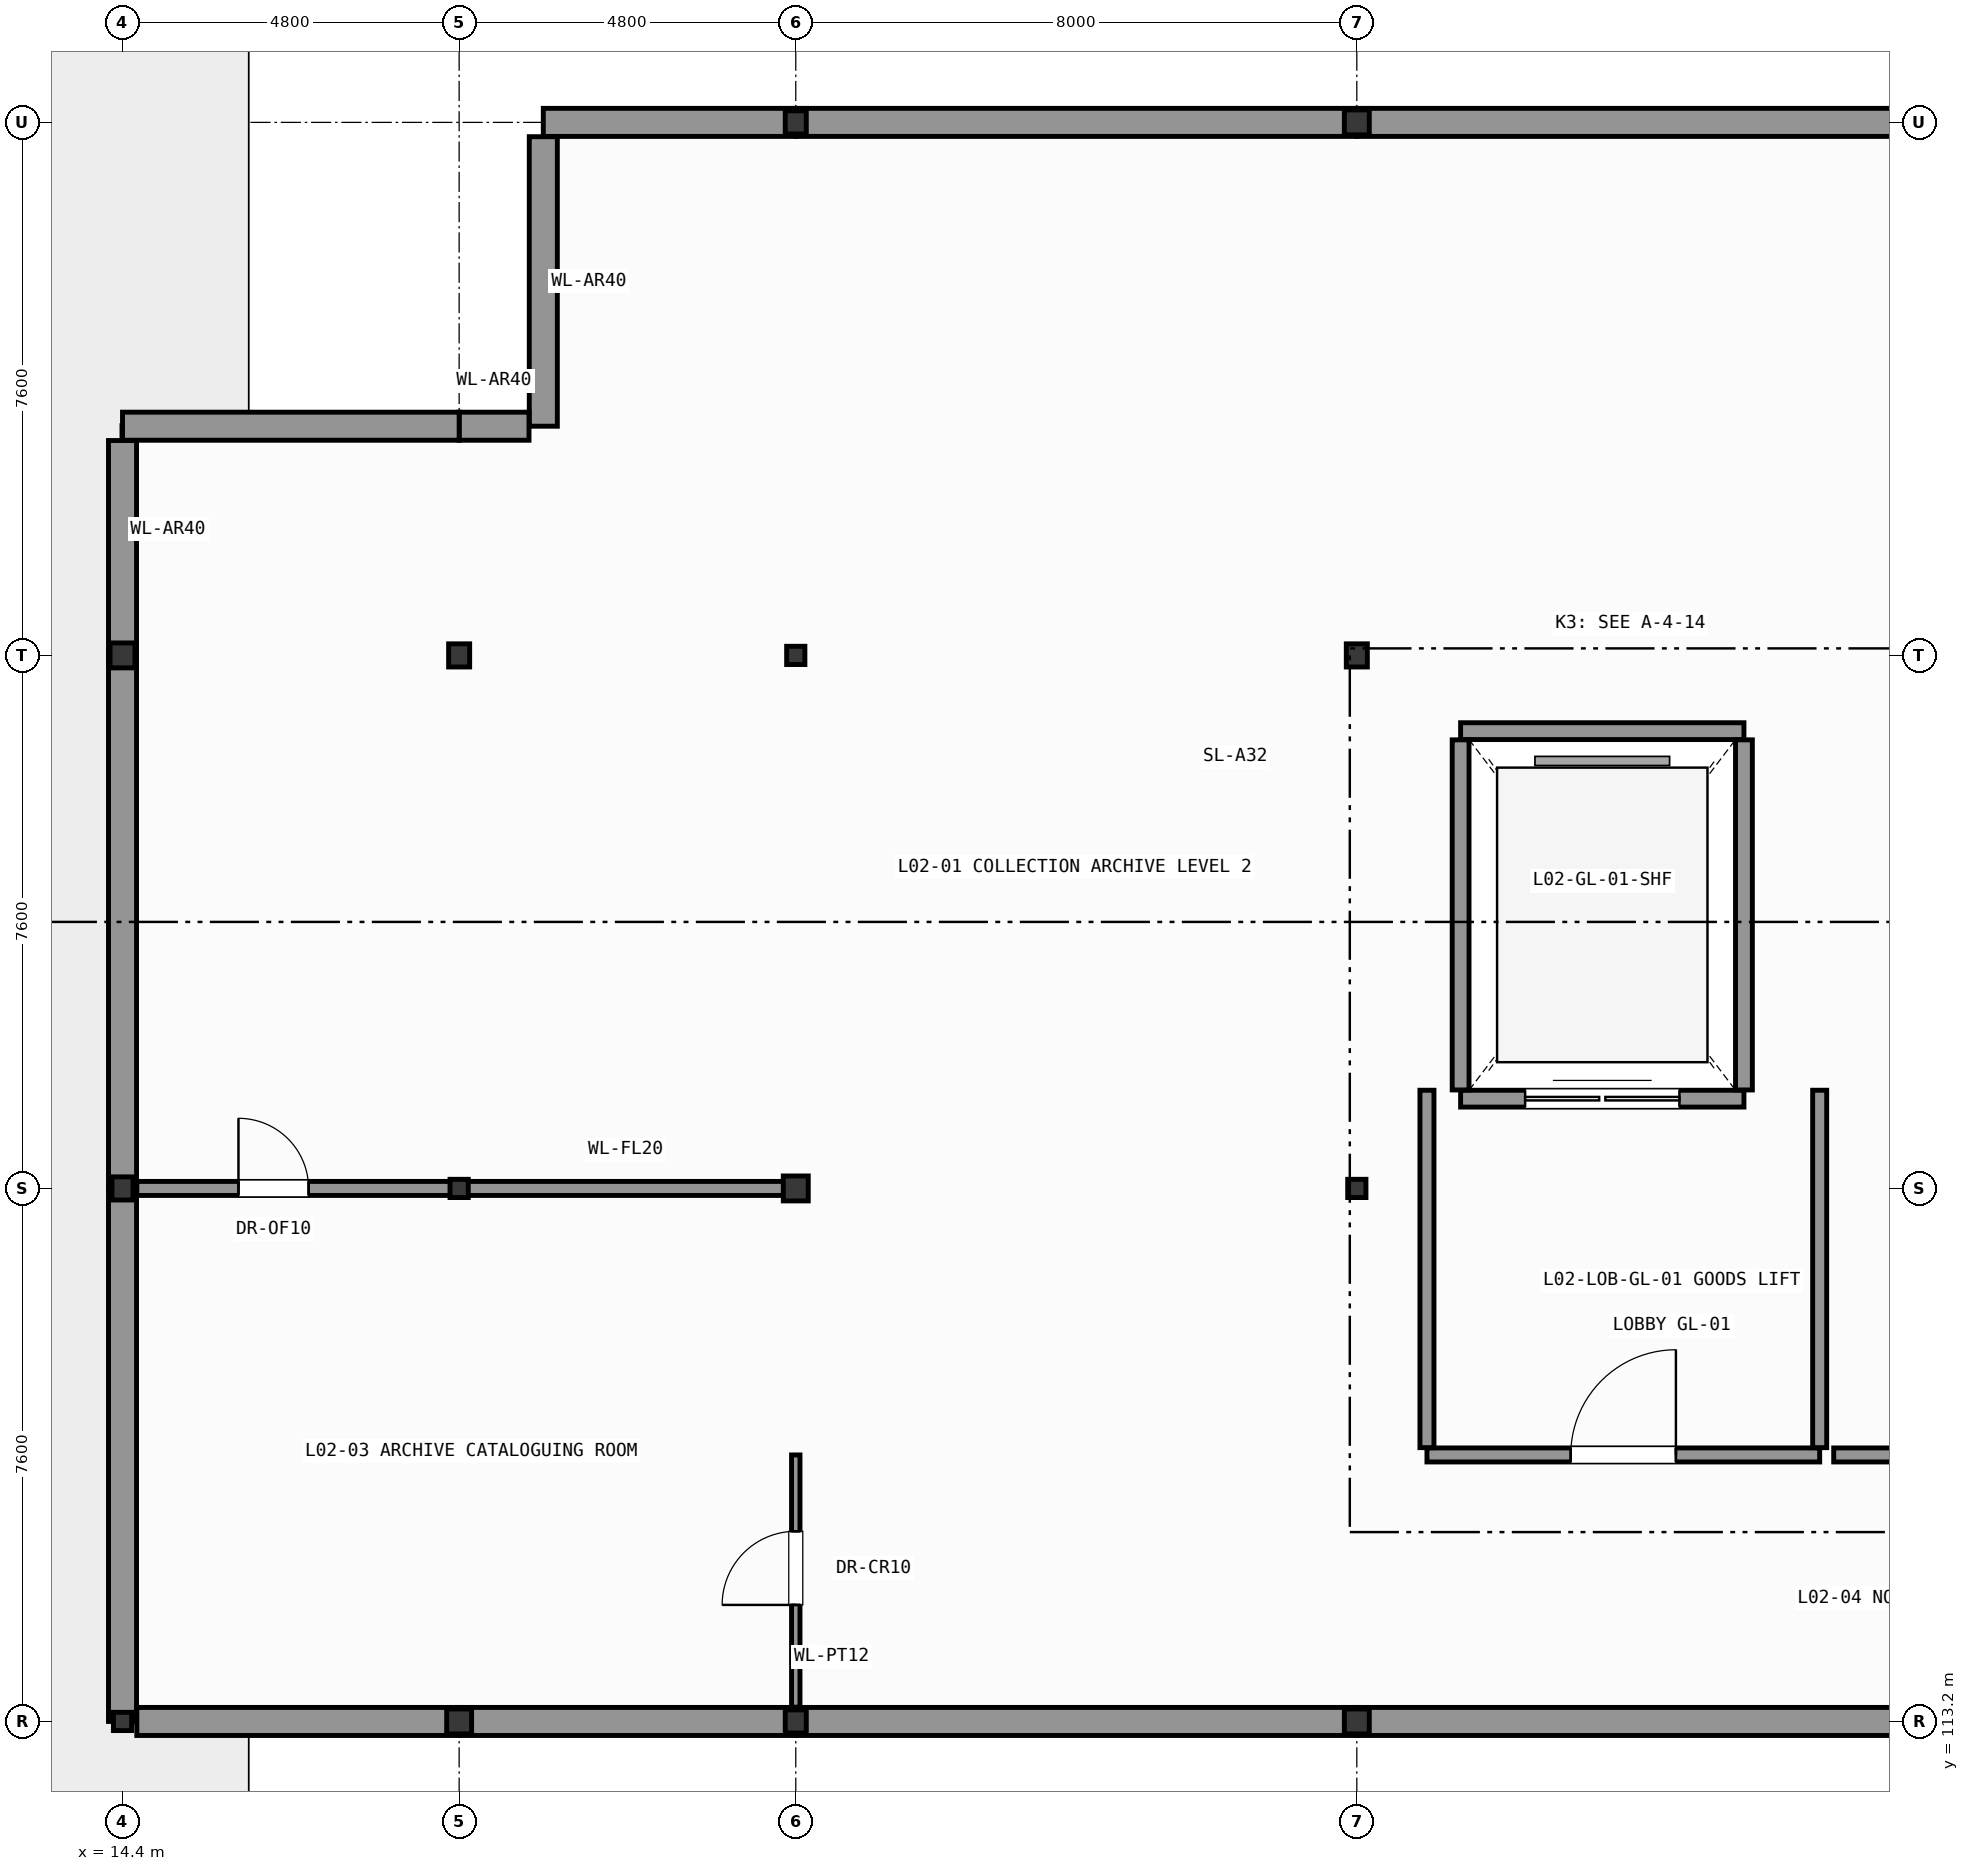
"""IFC4 building model, lengths in metres.
Left out: names, types, materials, properties, quantities, classifications, styles, units other than length and angle.
Written with IfcOpenShell. Run it as: python <this file> out.ifc"""

import sys

from ifc_helpers import new_model, si_unit, direction, frame, frame_2d, origin, origin_2d, place, context, subcontext, project, spatial, rectangle, hollow_rectangle, hollow_circle, i_section, extrude, element, fill, save


model = new_model("IFC4")
c1 = context("Model", 3, precision=1e-05, world=origin(), true_north=direction((0.0, 1.0)))
c2 = subcontext(c1, "Body", "Model", "MODEL_VIEW")
j1 = project(units=[si_unit("LENGTHUNIT", "METRE"), si_unit("PLANEANGLEUNIT", "RADIAN")], contexts=[c1])
p1 = place(None, origin())
s1 = spatial("IfcSite", under=j1, at=p1, CompositionType="ELEMENT")
p2 = place(p1, origin())
s2 = spatial("IfcBuilding", under=s1, at=p2, CompositionType="ELEMENT")
p3 = place(p2, frame((0.0, 0.0, 7.8)))
s3 = spatial("IfcBuildingStorey", under=s2, at=p3, CompositionType="ELEMENT", Elevation=7.8)
p4 = place(p3, frame((14.4, 113.2, 0.0), z_axis=(0.0, 0.0, 1.0), x_axis=(1.0, 0.0, 0.0)))
e1 = element("IfcColumn", 1, at=p4, inside=s3, PredefinedType="COLUMN", context=c2, shape_type="SweptSolid", body=[
    extrude(hollow_rectangle(XDim=0.26, YDim=0.26, WallThickness=0.012, InnerFilletRadius=0.012, OuterFilletRadius=0.025, at=origin_2d()), origin(), (0.0, 0.0, 1.0), 5.4),
])
p5 = place(p3, frame((14.4, 120.8, 0.0), z_axis=(0.0, 0.0, 1.0), x_axis=(1.0, 0.0, 0.0)))
e2 = element("IfcColumn", 2, at=p5, inside=s3, PredefinedType="COLUMN", context=c2, shape_type="SweptSolid", body=[
    extrude(i_section(OverallWidth=0.3, OverallDepth=0.33, WebThickness=0.01, FlangeThickness=0.017, FilletRadius=0.027, at=origin_2d()), origin(), (0.0, 0.0, 1.0), 5.4),
])
for number, where, z_axis, x_axis in (
    (3, (14.4, 128.4, 0.0), (0.0, 0.0, 1.0), (1.0, 0.0, 0.0)),
    (4, (19.2, 113.2, 0.0), (0.0, 0.0, 1.0), (1.0, 0.0, 0.0)),
):
    element("IfcColumn", number, at=place(p3, frame(where, z_axis=z_axis, x_axis=x_axis)), inside=s3, PredefinedType="COLUMN", context=c2, shape_type="SweptSolid", body=[
        extrude(hollow_circle(Radius=0.178, WallThickness=0.016, at=origin_2d()), origin(), (0.0, 0.0, 1.0), 5.4),
    ])
p6 = place(p3, frame((19.2, 120.8, 0.0), z_axis=(0.0, 0.0, 1.0), x_axis=(1.0, 0.0, 0.0)))
e5 = element("IfcColumn", 5, at=p6, inside=s3, PredefinedType="COLUMN", context=c2, shape_type="SweptSolid", body=[
    extrude(hollow_rectangle(XDim=0.26, YDim=0.26, WallThickness=0.012, InnerFilletRadius=0.012, OuterFilletRadius=0.025, at=origin_2d()), origin(), (0.0, 0.0, 1.0), 5.4),
])
for number, where, z_axis, x_axis in (
    (6, (19.2, 128.4, 0.0), (0.0, 0.0, 1.0), (1.0, 0.0, 0.0)),
    (7, (24.0, 113.2, 0.0), (0.0, 0.0, 1.0), (1.0, 0.0, 0.0)),
):
    element("IfcColumn", number, at=place(p3, frame(where, z_axis=z_axis, x_axis=x_axis)), inside=s3, PredefinedType="COLUMN", context=c2, shape_type="SweptSolid", body=[
        extrude(i_section(OverallWidth=0.3, OverallDepth=0.33, WebThickness=0.01, FlangeThickness=0.017, FilletRadius=0.027, at=origin_2d()), origin(), (0.0, 0.0, 1.0), 5.4),
    ])
p7 = place(p3, frame((24.0, 120.8, 0.0), z_axis=(0.0, 0.0, 1.0), x_axis=(1.0, 0.0, 0.0)))
e8 = element("IfcColumn", 8, at=p7, inside=s3, PredefinedType="COLUMN", context=c2, shape_type="SweptSolid", body=[
    extrude(hollow_circle(Radius=0.178, WallThickness=0.016, at=origin_2d()), origin(), (0.0, 0.0, 1.0), 5.4),
])
p8 = place(p3, frame((24.0, 128.4, 0.0), z_axis=(0.0, 0.0, 1.0), x_axis=(1.0, 0.0, 0.0)))
e9 = element("IfcColumn", 9, at=p8, inside=s3, PredefinedType="COLUMN", context=c2, shape_type="SweptSolid", body=[
    extrude(hollow_rectangle(XDim=0.26, YDim=0.26, WallThickness=0.012, InnerFilletRadius=0.012, OuterFilletRadius=0.025, at=origin_2d()), origin(), (0.0, 0.0, 1.0), 5.4),
])
p9 = place(p3, frame((24.0, 136.0, 0.0), z_axis=(0.0, 0.0, 1.0), x_axis=(1.0, 0.0, 0.0)))
e10 = element("IfcColumn", 10, at=p9, inside=s3, PredefinedType="COLUMN", context=c2, shape_type="SweptSolid", body=[
    extrude(i_section(OverallWidth=0.3, OverallDepth=0.33, WebThickness=0.01, FlangeThickness=0.017, FilletRadius=0.027, at=origin_2d()), origin(), (0.0, 0.0, 1.0), 5.4),
])
p10 = place(p3, frame((32.0, 113.2, 0.0), z_axis=(0.0, 0.0, 1.0), x_axis=(1.0, 0.0, 0.0)))
e11 = element("IfcColumn", 11, at=p10, inside=s3, PredefinedType="COLUMN", context=c2, shape_type="SweptSolid", body=[
    extrude(hollow_circle(Radius=0.178, WallThickness=0.016, at=origin_2d()), origin(), (0.0, 0.0, 1.0), 5.4),
])
p11 = place(p3, frame((32.0, 120.8, 0.0), z_axis=(0.0, 0.0, 1.0), x_axis=(1.0, 0.0, 0.0)))
e12 = element("IfcColumn", 12, at=p11, inside=s3, PredefinedType="COLUMN", context=c2, shape_type="SweptSolid", body=[
    extrude(hollow_rectangle(XDim=0.26, YDim=0.26, WallThickness=0.012, InnerFilletRadius=0.012, OuterFilletRadius=0.025, at=origin_2d()), origin(), (0.0, 0.0, 1.0), 5.4),
])
p12 = place(p3, frame((32.0, 128.4, 0.0), z_axis=(0.0, 0.0, 1.0), x_axis=(1.0, 0.0, 0.0)))
e13 = element("IfcColumn", 13, at=p12, inside=s3, PredefinedType="COLUMN", context=c2, shape_type="SweptSolid", body=[
    extrude(i_section(OverallWidth=0.3, OverallDepth=0.33, WebThickness=0.01, FlangeThickness=0.017, FilletRadius=0.027, at=origin_2d()), origin(), (0.0, 0.0, 1.0), 5.4),
])
p13 = place(p3, frame((32.0, 136.0, 0.0), z_axis=(0.0, 0.0, 1.0), x_axis=(1.0, 0.0, 0.0)))
e14 = element("IfcColumn", 14, at=p13, inside=s3, PredefinedType="COLUMN", context=c2, shape_type="SweptSolid", body=[
    extrude(hollow_circle(Radius=0.178, WallThickness=0.016, at=origin_2d()), origin(), (0.0, 0.0, 1.0), 5.4),
])
for number, where, z_axis, x_axis in (
    (15, (32.0, 136.0, 0.0), (0.0, 0.0, 1.0), (1.0, 0.0, 0.0)),
    (16, (24.0, 136.0, 0.0), (0.0, 0.0, 1.0), (1.0, 0.0, 0.0)),
):
    element("IfcWall", number, at=place(p3, frame(where, z_axis=z_axis, x_axis=x_axis)), inside=s3, PredefinedType="SOLIDWALL", context=c2, shape_type="SweptSolid", body=[
        extrude(rectangle(XDim=8.0, YDim=0.4, at=frame_2d((4.0, 0.0))), origin(), (0.0, 0.0, 1.0), 5.15),
    ])
p14 = place(p3, frame((20.4, 136.0, 0.0), z_axis=(0.0, 0.0, 1.0), x_axis=(1.0, 0.0, 0.0)))
e17 = element("IfcWall", 17, at=p14, inside=s3, PredefinedType="SOLIDWALL", context=c2, shape_type="SweptSolid", body=[
    extrude(rectangle(XDim=3.6, YDim=0.4, at=frame_2d((1.8, 0.0))), origin(), (0.0, 0.0, 1.0), 5.15),
])
p15 = place(p3, frame((20.4, 131.668, 0.0), z_axis=(0.0, 0.0, 1.0), x_axis=(0.0, 1.0, 0.0)))
e18 = element("IfcWall", 18, at=p15, inside=s3, PredefinedType="SOLIDWALL", context=c2, shape_type="SweptSolid", body=[
    extrude(rectangle(XDim=4.128, YDim=0.4, at=frame_2d((2.064, 0.0))), origin(), (0.0, 0.0, 1.0), 5.15),
])
p16 = place(p3, frame((19.2, 131.668, 0.0), z_axis=(0.0, 0.0, 1.0), x_axis=(1.0, 0.0, 0.0)))
e19 = element("IfcWall", 19, at=p16, inside=s3, PredefinedType="SOLIDWALL", context=c2, shape_type="SweptSolid", body=[
    extrude(rectangle(XDim=0.996, YDim=0.4, at=frame_2d((0.498, 0.0))), origin(), (0.0, 0.0, 1.0), 5.15),
])
p17 = place(p3, frame((14.4, 131.668, 0.0), z_axis=(0.0, 0.0, 1.0), x_axis=(1.0, 0.0, 0.0)))
e20 = element("IfcWall", 20, at=p17, inside=s3, PredefinedType="SOLIDWALL", context=c2, shape_type="SweptSolid", body=[
    extrude(rectangle(XDim=4.8, YDim=0.4, at=frame_2d((2.4, 0.0))), origin(), (0.0, 0.0, 1.0), 5.15),
])
p18 = place(p3, frame((14.4, 128.4, 0.0), z_axis=(0.0, 0.0, 1.0), x_axis=(0.0, 1.0, 0.0)))
e21 = element("IfcWall", 21, at=p18, inside=s3, PredefinedType="SOLIDWALL", context=c2, shape_type="SweptSolid", body=[
    extrude(rectangle(XDim=3.064, YDim=0.4, at=frame_2d((1.532, 0.0))), origin(), (0.0, 0.0, 1.0), 5.15),
])
p19 = place(p3, frame((14.4, 120.8, 0.0), z_axis=(0.0, 0.0, 1.0), x_axis=(0.0, 1.0, 0.0)))
e22 = element("IfcWall", 22, at=p19, inside=s3, PredefinedType="SOLIDWALL", context=c2, shape_type="SweptSolid", body=[
    extrude(rectangle(XDim=7.6, YDim=0.4, at=frame_2d((3.8, 0.0))), origin(), (0.0, 0.0, 1.0), 5.15),
])
p20 = place(p3, frame((14.4, 113.2, 0.0), z_axis=(0.0, 0.0, 1.0), x_axis=(0.0, 1.0, 0.0)))
e23 = element("IfcWall", 23, at=p20, inside=s3, PredefinedType="SOLIDWALL", context=c2, shape_type="SweptSolid", body=[
    extrude(rectangle(XDim=7.6, YDim=0.4, at=frame_2d((3.8, 0.0))), origin(), (0.0, 0.0, 1.0), 5.15),
])
p21 = place(p3, frame((19.2, 113.2, 0.0), z_axis=(0.0, 0.0, 1.0), x_axis=(-1.0, 0.0, 0.0)))
e24 = element("IfcWall", 24, at=p21, inside=s3, PredefinedType="SOLIDWALL", context=c2, shape_type="SweptSolid", body=[
    extrude(rectangle(XDim=4.596, YDim=0.4, at=frame_2d((2.298, 0.0))), origin(), (0.0, 0.0, 1.0), 5.15),
])
p22 = place(p3, frame((24.0, 113.2, 0.0), z_axis=(0.0, 0.0, 1.0), x_axis=(-1.0, 0.0, 0.0)))
e25 = element("IfcWall", 25, at=p22, inside=s3, PredefinedType="SOLIDWALL", context=c2, shape_type="SweptSolid", body=[
    extrude(rectangle(XDim=4.8, YDim=0.4, at=frame_2d((2.4, 0.0))), origin(), (0.0, 0.0, 1.0), 5.15),
])
for number, where, z_axis, x_axis in (
    (26, (32.0, 113.2, 0.0), (0.0, 0.0, 1.0), (-1.0, 0.0, 0.0)),
    (27, (40.0, 113.2, 0.0), (0.0, 0.0, 1.0), (-1.0, 0.0, 0.0)),
):
    element("IfcWall", number, at=place(p3, frame(where, z_axis=z_axis, x_axis=x_axis)), inside=s3, PredefinedType="SOLIDWALL", context=c2, shape_type="SweptSolid", body=[
        extrude(rectangle(XDim=8.0, YDim=0.4, at=frame_2d((4.0, 0.0))), origin(), (0.0, 0.0, 1.0), 5.15),
    ])
p23 = place(p3, frame((33.48, 122.08, 0.0), z_axis=(0.0, 0.0, 1.0), x_axis=(1.0, 0.0, 0.0)))
e28 = element("IfcWall", 28, at=p23, inside=s3, PredefinedType="SHEAR", context=c2, shape_type="SweptSolid", body=[
    extrude(rectangle(XDim=4.04, YDim=0.24, at=frame_2d((2.02, 0.0))), origin(), (0.0, 0.0, 1.0), 5.15),
])
p24 = place(p23, frame((0.92, 0.0, 0.0)))
e29 = element("IfcOpeningElement", 29, at=p24, cuts=e28, PredefinedType="OPENING", context=c2, shape_type="SweptSolid", body=[
    extrude(rectangle(XDim=2.2, YDim=2.6, at=frame_2d((1.1, 1.3))), frame((0.0, 0.13, 0.0), z_axis=(0.0, -1.0, 0.0), x_axis=(1.0, 0.0, 0.0)), (0.0, 0.0, 1.0), 0.26),
])
p25 = place(p3, frame((33.48, 127.32, 0.0), z_axis=(0.0, 0.0, 1.0), x_axis=(1.0, 0.0, 0.0)))
e30 = element("IfcWall", 30, at=p25, inside=s3, PredefinedType="SHEAR", context=c2, shape_type="SweptSolid", body=[
    extrude(rectangle(XDim=4.04, YDim=0.24, at=frame_2d((2.02, 0.0))), origin(), (0.0, 0.0, 1.0), 5.15),
])
for number, where, z_axis, x_axis in (
    (31, (33.48, 122.204, 0.0), (0.0, 0.0, 1.0), (0.0, 1.0, 0.0)),
    (32, (37.52, 122.204, 0.0), (0.0, 0.0, 1.0), (0.0, 1.0, 0.0)),
):
    element("IfcWall", number, at=place(p3, frame(where, z_axis=z_axis, x_axis=x_axis)), inside=s3, PredefinedType="SHEAR", context=c2, shape_type="SweptSolid", body=[
        extrude(rectangle(XDim=4.992, YDim=0.24, at=frame_2d((2.496, 0.0))), origin(), (0.0, 0.0, 1.0), 5.15),
    ])
p26 = place(p3, frame((33.0, 117.0, 0.0), z_axis=(0.0, 0.0, 1.0), x_axis=(1.0, 0.0, 0.0)))
e33 = element("IfcWall", 33, at=p26, inside=s3, PredefinedType="PARTITIONING", context=c2, shape_type="SweptSolid", body=[
    extrude(rectangle(XDim=5.6, YDim=0.2, at=frame_2d((2.8, 0.0))), origin(), (0.0, 0.0, 1.0), 5.15),
])
p27 = place(p26, frame((2.05, 0.0, 0.0)))
e34 = element("IfcOpeningElement", 34, at=p27, cuts=e33, PredefinedType="OPENING", context=c2, shape_type="SweptSolid", body=[
    extrude(rectangle(XDim=1.5, YDim=2.2, at=frame_2d((0.75, 1.1))), frame((0.0, 0.11, 0.0), z_axis=(0.0, -1.0, 0.0), x_axis=(1.0, 0.0, 0.0)), (0.0, 0.0, 1.0), 0.22),
])
for number, where, z_axis, x_axis in (
    (35, (33.0, 117.104, 0.0), (0.0, 0.0, 1.0), (0.0, 1.0, 0.0)),
    (36, (38.6, 117.104, 0.0), (0.0, 0.0, 1.0), (0.0, 1.0, 0.0)),
):
    element("IfcWall", number, at=place(p3, frame(where, z_axis=z_axis, x_axis=x_axis)), inside=s3, PredefinedType="PARTITIONING", context=c2, shape_type="SweptSolid", body=[
        extrude(rectangle(XDim=5.096, YDim=0.2, at=frame_2d((2.548, 0.0))), origin(), (0.0, 0.0, 1.0), 5.15),
    ])
p28 = place(p3, frame((14.604, 120.8, 0.0), z_axis=(0.0, 0.0, 1.0), x_axis=(1.0, 0.0, 0.0)))
e37 = element("IfcWall", 37, at=p28, inside=s3, PredefinedType="PARTITIONING", context=c2, shape_type="SweptSolid", body=[
    extrude(rectangle(XDim=9.396, YDim=0.2, at=frame_2d((4.698, 0.0))), origin(), (0.0, 0.0, 1.0), 4.685),
])
p29 = place(p28, frame((1.449, 0.0, 0.0)))
e38 = element("IfcOpeningElement", 38, at=p29, cuts=e37, PredefinedType="OPENING", context=c2, shape_type="SweptSolid", body=[
    extrude(rectangle(XDim=1.0, YDim=2.15, at=frame_2d((0.5, 1.075))), frame((0.0, 0.11, 0.0), z_axis=(0.0, -1.0, 0.0), x_axis=(1.0, 0.0, 0.0)), (0.0, 0.0, 1.0), 0.22),
])
p30 = place(p3, frame((38.8, 117.0, 0.0), z_axis=(0.0, 0.0, 1.0), x_axis=(1.0, 0.0, 0.0)))
e39 = element("IfcWall", 39, at=p30, inside=s3, PredefinedType="PARTITIONING", context=c2, shape_type="SweptSolid", body=[
    extrude(rectangle(XDim=9.446, YDim=0.2, at=frame_2d((4.723, 0.0))), origin(), (0.0, 0.0, 1.0), 5.15),
])
p31 = place(p30, frame((3.823, 0.0, 0.0)))
e40 = element("IfcOpeningElement", 40, at=p31, cuts=e39, PredefinedType="OPENING", context=c2, shape_type="SweptSolid", body=[
    extrude(rectangle(XDim=1.8, YDim=2.4, at=frame_2d((0.9, 1.2))), frame((0.0, 0.11, 0.0), z_axis=(0.0, -1.0, 0.0), x_axis=(1.0, 0.0, 0.0)), (0.0, 0.0, 1.0), 0.22),
])
p32 = place(p3, frame((24.0, 113.404, 0.0), z_axis=(0.0, 0.0, 1.0), x_axis=(0.0, 1.0, 0.0)))
e41 = element("IfcWall", 41, at=p32, inside=s3, PredefinedType="PARTITIONING", context=c2, shape_type="SweptSolid", body=[
    extrude(rectangle(XDim=3.596, YDim=0.12, at=frame_2d((1.798, 0.0))), origin(), (0.0, 0.0, 1.0), 4.635),
])
p33 = place(p32, frame((1.458, 0.0, 0.0)))
e42 = element("IfcOpeningElement", 42, at=p33, cuts=e41, PredefinedType="OPENING", context=c2, shape_type="SweptSolid", body=[
    extrude(rectangle(XDim=1.05, YDim=2.2, at=frame_2d((0.525, 1.1))), frame((0.0, 0.07, 0.0), z_axis=(0.0, -1.0, 0.0), x_axis=(1.0, 0.0, 0.0)), (0.0, 0.0, 1.0), 0.14),
])
p34 = place(p24, origin())
e43 = element("IfcDoor", 43, at=p34, inside=s3, OperationType="DOUBLE_DOOR_SLIDING", PredefinedType="DOOR", context=c2, shape_type="SweptSolid", body=[
    extrude(rectangle(XDim=2.2, YDim=2.6, at=frame_2d((1.1, 1.3))), frame((0.0, 0.025, 0.0), z_axis=(0.0, -1.0, 0.0), x_axis=(1.0, 0.0, 0.0)), (0.0, 0.0, 1.0), 0.05),
])
fill(e29, e43)
p35 = place(p27, origin())
e44 = element("IfcDoor", 44, at=p35, inside=s3, OperationType="SINGLE_SWING_RIGHT", PredefinedType="DOOR", context=c2, shape_type="SweptSolid", body=[
    extrude(rectangle(XDim=1.5, YDim=2.2, at=frame_2d((0.75, 1.1))), frame((0.0, 0.025, 0.0), z_axis=(0.0, -1.0, 0.0), x_axis=(1.0, 0.0, 0.0)), (0.0, 0.0, 1.0), 0.05),
])
fill(e34, e44)
p36 = place(p29, origin())
e45 = element("IfcDoor", 45, at=p36, inside=s3, OperationType="SINGLE_SWING_LEFT", PredefinedType="DOOR", context=c2, shape_type="SweptSolid", body=[
    extrude(rectangle(XDim=1.0, YDim=2.15, at=frame_2d((0.5, 1.075))), frame((0.0, 0.025, 0.0), z_axis=(0.0, -1.0, 0.0), x_axis=(1.0, 0.0, 0.0)), (0.0, 0.0, 1.0), 0.05),
])
fill(e38, e45)
p37 = place(p33, origin())
e46 = element("IfcDoor", 46, at=p37, inside=s3, OperationType="SINGLE_SWING_LEFT", PredefinedType="DOOR", context=c2, shape_type="SweptSolid", body=[
    extrude(rectangle(XDim=1.05, YDim=2.2, at=frame_2d((0.525, 1.1))), frame((0.0, 0.025, 0.0), z_axis=(0.0, -1.0, 0.0), x_axis=(1.0, 0.0, 0.0)), (0.0, 0.0, 1.0), 0.05),
])
fill(e42, e46)
save(model, sys.argv[1])
